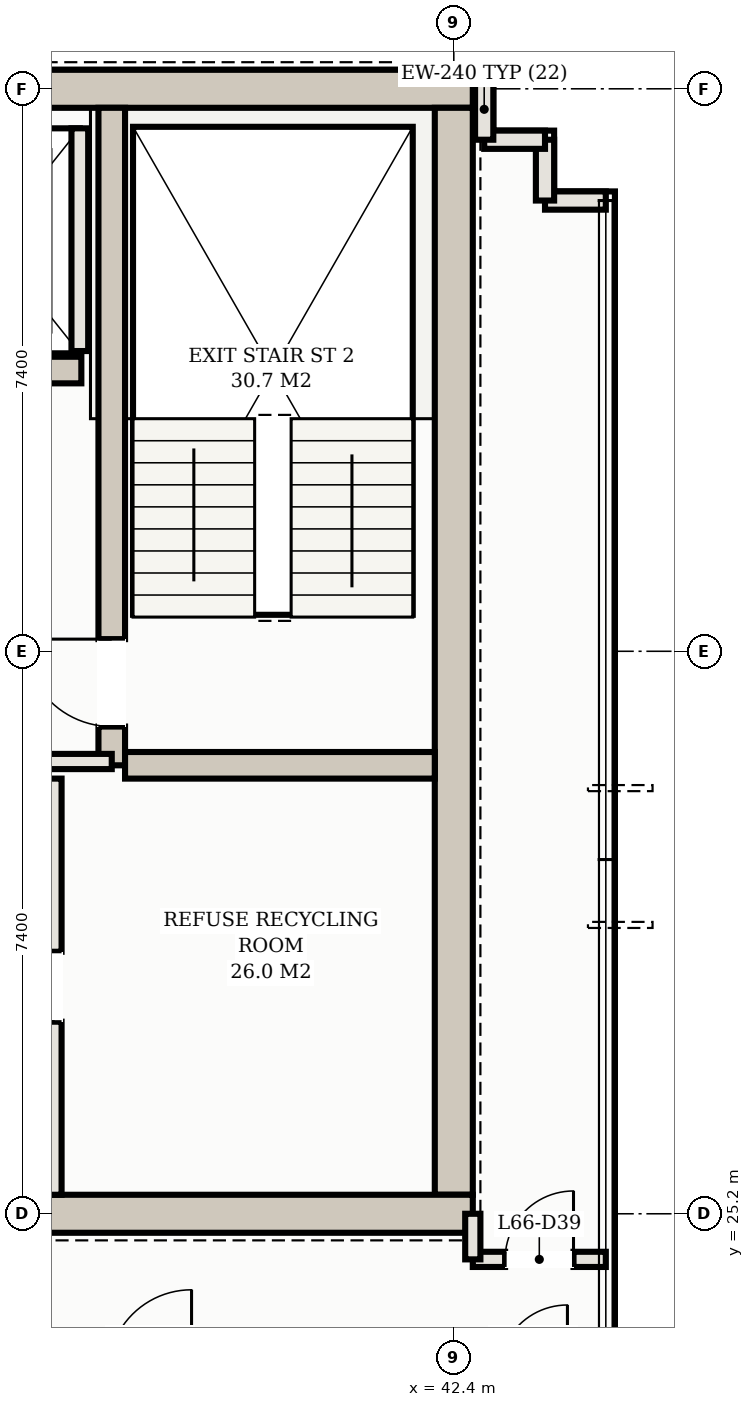
"""IFC4 building model, lengths in metres.
Left out: names, types, materials, properties, quantities, classifications, styles, units other than length and angle.
Written with IfcOpenShell. Run it as: python <this file> out.ifc"""

import sys

from ifc_helpers import new_model, si_unit, direction, frame, frame_2d, origin, place, context, subcontext, project, spatial, rectangle, extrude, element, fill, save


model = new_model("IFC4")
c1 = context("Model", 3, precision=1e-05, world=origin(), true_north=direction((0.0, 1.0)))
c2 = subcontext(c1, "Body", "Model", "MODEL_VIEW")
j1 = project(units=[si_unit("LENGTHUNIT", "METRE"), si_unit("PLANEANGLEUNIT", "RADIAN")], contexts=[c1])
p1 = place(None, origin())
s1 = spatial("IfcSite", under=j1, at=p1, CompositionType="ELEMENT")
p2 = place(p1, origin())
s2 = spatial("IfcBuilding", under=s1, at=p2, CompositionType="ELEMENT")
p3 = place(p2, frame((0.0, 0.0, 239.6)))
s3 = spatial("IfcBuildingStorey", under=s2, at=p3, CompositionType="ELEMENT", Elevation=239.6)
p4 = place(p3, frame((10.35, 40.0, 0.0), z_axis=(0.0, 0.0, 1.0), x_axis=(1.0, 0.0, 0.0)))
e1 = element("IfcWall", 1, at=p4, inside=s3, PredefinedType="SHEAR", context=c2, shape_type="SweptSolid", body=[
    extrude(rectangle(XDim=32.3, YDim=0.5, at=frame_2d((16.15, 0.0))), origin(), (0.0, 0.0, 1.0), 3.11),
])
p5 = place(p3, frame((42.4, 25.45, 0.0), z_axis=(0.0, 0.0, 1.0), x_axis=(0.0, 1.0, 0.0)))
e2 = element("IfcWall", 2, at=p5, inside=s3, PredefinedType="SHEAR", context=c2, shape_type="SweptSolid", body=[
    extrude(rectangle(XDim=14.3, YDim=0.5, at=frame_2d((7.15, 0.0))), origin(), (0.0, 0.0, 1.0), 3.11),
])
p6 = place(p3, frame((34.6, 25.2, 0.0), z_axis=(0.0, 0.0, 1.0), x_axis=(1.0, 0.0, 0.0)))
e3 = element("IfcWall", 3, at=p6, inside=s3, PredefinedType="SHEAR", context=c2, shape_type="SweptSolid", body=[
    extrude(rectangle(XDim=8.05, YDim=0.5, at=frame_2d((4.025, 0.0))), origin(), (0.0, 0.0, 1.0), 3.11),
])
p7 = place(p6, frame((0.65, 0.0, 0.0)))
e4 = element("IfcOpeningElement", 4, at=p7, cuts=e3, PredefinedType="OPENING", context=c2, shape_type="SweptSolid", body=[
    extrude(rectangle(XDim=1.25, YDim=2.2, at=frame_2d((0.625, 1.1))), frame((0.0, 0.26, 0.0), z_axis=(0.0, -1.0, 0.0), x_axis=(1.0, 0.0, 0.0)), (0.0, 0.0, 1.0), 0.52),
])
p8 = place(p3, frame((37.9, 31.1, 0.0), z_axis=(0.0, 0.0, 1.0), x_axis=(0.0, 1.0, 0.0)))
e5 = element("IfcWall", 5, at=p8, inside=s3, PredefinedType="SHEAR", context=c2, shape_type="SweptSolid", body=[
    extrude(rectangle(XDim=8.65, YDim=0.35, at=frame_2d((4.325, 0.0))), origin(), (0.0, 0.0, 1.0), 3.11),
])
p9 = place(p8, frame((0.51, 0.0, 0.0)))
e6 = element("IfcOpeningElement", 6, at=p9, cuts=e5, PredefinedType="OPENING", context=c2, shape_type="SweptSolid", body=[
    extrude(rectangle(XDim=1.15, YDim=2.2, at=frame_2d((0.575, 1.1))), frame((0.0, 0.185, 0.0), z_axis=(0.0, -1.0, 0.0), x_axis=(1.0, 0.0, 0.0)), (0.0, 0.0, 1.0), 0.37),
])
p10 = place(p3, frame((38.075, 31.1, 0.0), z_axis=(0.0, 0.0, 1.0), x_axis=(1.0, 0.0, 0.0)))
e7 = element("IfcWall", 7, at=p10, inside=s3, PredefinedType="SHEAR", context=c2, shape_type="SweptSolid", body=[
    extrude(rectangle(XDim=4.075, YDim=0.35, at=frame_2d((2.038, 0.0))), origin(), (0.0, 0.0, 1.0), 3.11),
])
p11 = place(p3, frame((15.5, 36.3, 0.0), z_axis=(0.0, 0.0, 1.0), x_axis=(1.0, 0.0, 0.0)))
e8 = element("IfcWall", 8, at=p11, inside=s3, PredefinedType="SHEAR", context=c2, shape_type="SweptSolid", body=[
    extrude(rectangle(XDim=22.0, YDim=0.35, at=frame_2d((11.0, 0.0))), origin(), (0.0, 0.0, 1.0), 3.11),
])
p12 = place(p11, frame((0.65, 0.0, 0.0)))
e9 = element("IfcOpeningElement", 9, at=p12, cuts=e8, PredefinedType="OPENING", context=c2, shape_type="SweptSolid", body=[
    extrude(rectangle(XDim=1.1, YDim=2.15, at=frame_2d((0.55, 1.075))), frame((0.0, 0.185, 0.0), z_axis=(0.0, -1.0, 0.0), x_axis=(1.0, 0.0, 0.0)), (0.0, 0.0, 1.0), 0.37),
])
p13 = place(p11, frame((20.25, 0.0, 0.0)))
e10 = element("IfcOpeningElement", 10, at=p13, cuts=e8, PredefinedType="OPENING", context=c2, shape_type="SweptSolid", body=[
    extrude(rectangle(XDim=1.1, YDim=2.15, at=frame_2d((0.55, 1.075))), frame((0.0, 0.185, 0.0), z_axis=(0.0, -1.0, 0.0), x_axis=(1.0, 0.0, 0.0)), (0.0, 0.0, 1.0), 0.37),
])
p14 = place(p11, frame((17.05, 0.0, 0.0)))
e11 = element("IfcOpeningElement", 11, at=p14, cuts=e8, PredefinedType="OPENING", context=c2, shape_type="SweptSolid", body=[
    extrude(rectangle(XDim=1.3, YDim=2.2, at=frame_2d((0.65, 1.1))), frame((0.0, 0.185, 0.0), z_axis=(0.0, -1.0, 0.0), x_axis=(1.0, 0.0, 0.0)), (0.0, 0.0, 1.0), 0.37),
])
p15 = place(p11, frame((3.95, 0.0, 0.0)))
e12 = element("IfcOpeningElement", 12, at=p15, cuts=e8, PredefinedType="OPENING", context=c2, shape_type="SweptSolid", body=[
    extrude(rectangle(XDim=1.1, YDim=2.15, at=frame_2d((0.55, 1.075))), frame((0.0, 0.185, 0.0), z_axis=(0.0, -1.0, 0.0), x_axis=(1.0, 0.0, 0.0)), (0.0, 0.0, 1.0), 0.37),
])
p16 = place(p11, frame((6.55, 0.0, 0.0)))
e13 = element("IfcOpeningElement", 13, at=p16, cuts=e8, PredefinedType="OPENING", context=c2, shape_type="SweptSolid", body=[
    extrude(rectangle(XDim=1.1, YDim=2.15, at=frame_2d((0.55, 1.075))), frame((0.0, 0.185, 0.0), z_axis=(0.0, -1.0, 0.0), x_axis=(1.0, 0.0, 0.0)), (0.0, 0.0, 1.0), 0.37),
])
p17 = place(p11, frame((9.15, 0.0, 0.0)))
e14 = element("IfcOpeningElement", 14, at=p17, cuts=e8, PredefinedType="OPENING", context=c2, shape_type="SweptSolid", body=[
    extrude(rectangle(XDim=1.1, YDim=2.15, at=frame_2d((0.55, 1.075))), frame((0.0, 0.185, 0.0), z_axis=(0.0, -1.0, 0.0), x_axis=(1.0, 0.0, 0.0)), (0.0, 0.0, 1.0), 0.37),
])
p18 = place(p3, frame((37.48, 36.55, 0.0), z_axis=(0.0, 0.0, 1.0), x_axis=(0.0, 1.0, 0.0)))
e15 = element("IfcWall", 15, at=p18, inside=s3, PredefinedType="SOLIDWALL", context=c2, shape_type="SweptSolid", body=[
    extrude(rectangle(XDim=2.93, YDim=0.22, at=frame_2d((1.465, 0.0))), origin(), (0.0, 0.0, 1.0), 3.11),
])
p19 = place(p3, frame((44.4, 38.53, 0.0), z_axis=(0.0, 0.0, 1.0), x_axis=(-1.0, 0.0, 0.0)))
e16 = element("IfcWall", 16, at=p19, inside=s3, PredefinedType="SOLIDWALL", context=c2, shape_type="SweptSolid", body=[
    extrude(rectangle(XDim=0.8, YDim=0.24, at=frame_2d((0.4, 0.0))), origin(), (0.0, 0.0, 1.0), 3.11),
])
for number, where, z_axis, x_axis in (
    (17, (43.6, 38.53, 0.0), (0.0, 0.0, 1.0), (0.0, 1.0, 0.0)),
    (18, (43.6, 39.33, 0.0), (0.0, 0.0, 1.0), (-1.0, 0.0, 0.0)),
):
    element("IfcWall", number, at=place(p3, frame(where, z_axis=z_axis, x_axis=x_axis)), inside=s3, PredefinedType="SOLIDWALL", context=c2, shape_type="SweptSolid", body=[
        extrude(rectangle(XDim=0.8, YDim=0.24, at=frame_2d((0.4, 0.0))), origin(), (0.0, 0.0, 1.0), 3.11),
    ])
p20 = place(p3, frame((42.8, 39.33, 0.0), z_axis=(0.0, 0.0, 1.0), x_axis=(0.0, 1.0, 0.0)))
e19 = element("IfcWall", 19, at=p20, inside=s3, PredefinedType="SOLIDWALL", context=c2, shape_type="SweptSolid", body=[
    extrude(rectangle(XDim=0.8, YDim=0.24, at=frame_2d((0.4, 0.0))), origin(), (0.0, 0.0, 1.0), 3.11),
])
p21 = place(p3, frame((34.65, 31.15, 0.0), z_axis=(0.0, 0.0, 1.0), x_axis=(1.0, 0.0, 0.0)))
e20 = element("IfcWall", 20, at=p21, inside=s3, PredefinedType="PARTITIONING", context=c2, shape_type="SweptSolid", body=[
    extrude(rectangle(XDim=3.25, YDim=0.2, at=frame_2d((1.625, 0.0))), origin(), (0.0, 0.0, 1.0), 2.45),
])
p22 = place(p21, frame((0.725, 0.0, 0.0)))
e21 = element("IfcOpeningElement", 21, at=p22, cuts=e20, PredefinedType="OPENING", context=c2, shape_type="SweptSolid", body=[
    extrude(rectangle(XDim=1.25, YDim=2.2, at=frame_2d((0.625, 1.1))), frame((0.0, 0.11, 0.0), z_axis=(0.0, -1.0, 0.0), x_axis=(1.0, 0.0, 0.0)), (0.0, 0.0, 1.0), 0.22),
])
p23 = place(p3, frame((37.15, 25.45, 0.0), z_axis=(0.0, 0.0, 1.0), x_axis=(0.0, 1.0, 0.0)))
e22 = element("IfcWall", 22, at=p23, inside=s3, PredefinedType="PARTITIONING", context=c2, shape_type="SweptSolid", body=[
    extrude(rectangle(XDim=5.475, YDim=0.18, at=frame_2d((2.738, 0.0))), origin(), (0.0, 0.0, 1.0), 2.45),
])
p24 = place(p23, frame((2.277, 0.0, 0.0)))
e23 = element("IfcOpeningElement", 23, at=p24, cuts=e22, PredefinedType="OPENING", context=c2, shape_type="SweptSolid", body=[
    extrude(rectangle(XDim=0.92, YDim=2.15, at=frame_2d((0.46, 1.075))), frame((0.0, 0.1, 0.0), z_axis=(0.0, -1.0, 0.0), x_axis=(1.0, 0.0, 0.0)), (0.0, 0.0, 1.0), 0.2),
])
p25 = place(p3, frame((42.65, 24.6, 0.0), z_axis=(0.0, 0.0, 1.0), x_axis=(1.0, 0.0, 0.0)))
e24 = element("IfcWall", 24, at=p25, inside=s3, PredefinedType="PARTITIONING", context=c2, shape_type="SweptSolid", body=[
    extrude(rectangle(XDim=1.75, YDim=0.2, at=frame_2d((0.875, 0.0))), origin(), (0.0, 0.0, 1.0), 2.45),
])
p26 = place(p25, frame((0.425, 0.0, 0.0)))
e25 = element("IfcOpeningElement", 25, at=p26, cuts=e24, PredefinedType="OPENING", context=c2, shape_type="SweptSolid", body=[
    extrude(rectangle(XDim=0.9, YDim=2.15, at=frame_2d((0.45, 1.075))), frame((0.0, 0.11, 0.0), z_axis=(0.0, -1.0, 0.0), x_axis=(1.0, 0.0, 0.0)), (0.0, 0.0, 1.0), 0.22),
])
p27 = place(p3, frame((42.65, 24.6, 0.0), z_axis=(0.0, 0.0, 1.0), x_axis=(0.0, 1.0, 0.0)))
e26 = element("IfcWall", 26, at=p27, inside=s3, PredefinedType="PARTITIONING", context=c2, shape_type="SweptSolid", body=[
    extrude(rectangle(XDim=0.6, YDim=0.2, at=frame_2d((0.3, 0.0))), origin(), (0.0, 0.0, 1.0), 2.45),
])
p28 = place(p9, origin())
e27 = element("IfcDoor", 27, at=p28, inside=s3, OperationType="SINGLE_SWING_RIGHT", PredefinedType="DOOR", context=c2, shape_type="SweptSolid", body=[
    extrude(rectangle(XDim=1.15, YDim=2.2, at=frame_2d((0.575, 1.1))), frame((0.0, 0.025, 0.0), z_axis=(0.0, -1.0, 0.0), x_axis=(1.0, 0.0, 0.0)), (0.0, 0.0, 1.0), 0.05),
])
fill(e6, e27)
p29 = place(p24, origin())
e28 = element("IfcDoor", 28, at=p29, inside=s3, OperationType="SINGLE_SWING_LEFT", PredefinedType="DOOR", context=c2, shape_type="SweptSolid", body=[
    extrude(rectangle(XDim=0.92, YDim=2.15, at=frame_2d((0.46, 1.075))), frame((0.0, 0.025, 0.0), z_axis=(0.0, -1.0, 0.0), x_axis=(1.0, 0.0, 0.0)), (0.0, 0.0, 1.0), 0.05),
])
fill(e23, e28)
p30 = place(p26, origin())
e29 = element("IfcDoor", 29, at=p30, inside=s3, OperationType="SINGLE_SWING_RIGHT", PredefinedType="DOOR", context=c2, shape_type="SweptSolid", body=[
    extrude(rectangle(XDim=0.9, YDim=2.15, at=frame_2d((0.45, 1.075))), frame((0.0, 0.025, 0.0), z_axis=(0.0, -1.0, 0.0), x_axis=(1.0, 0.0, 0.0)), (0.0, 0.0, 1.0), 0.05),
])
fill(e25, e29)
save(model, sys.argv[1])
